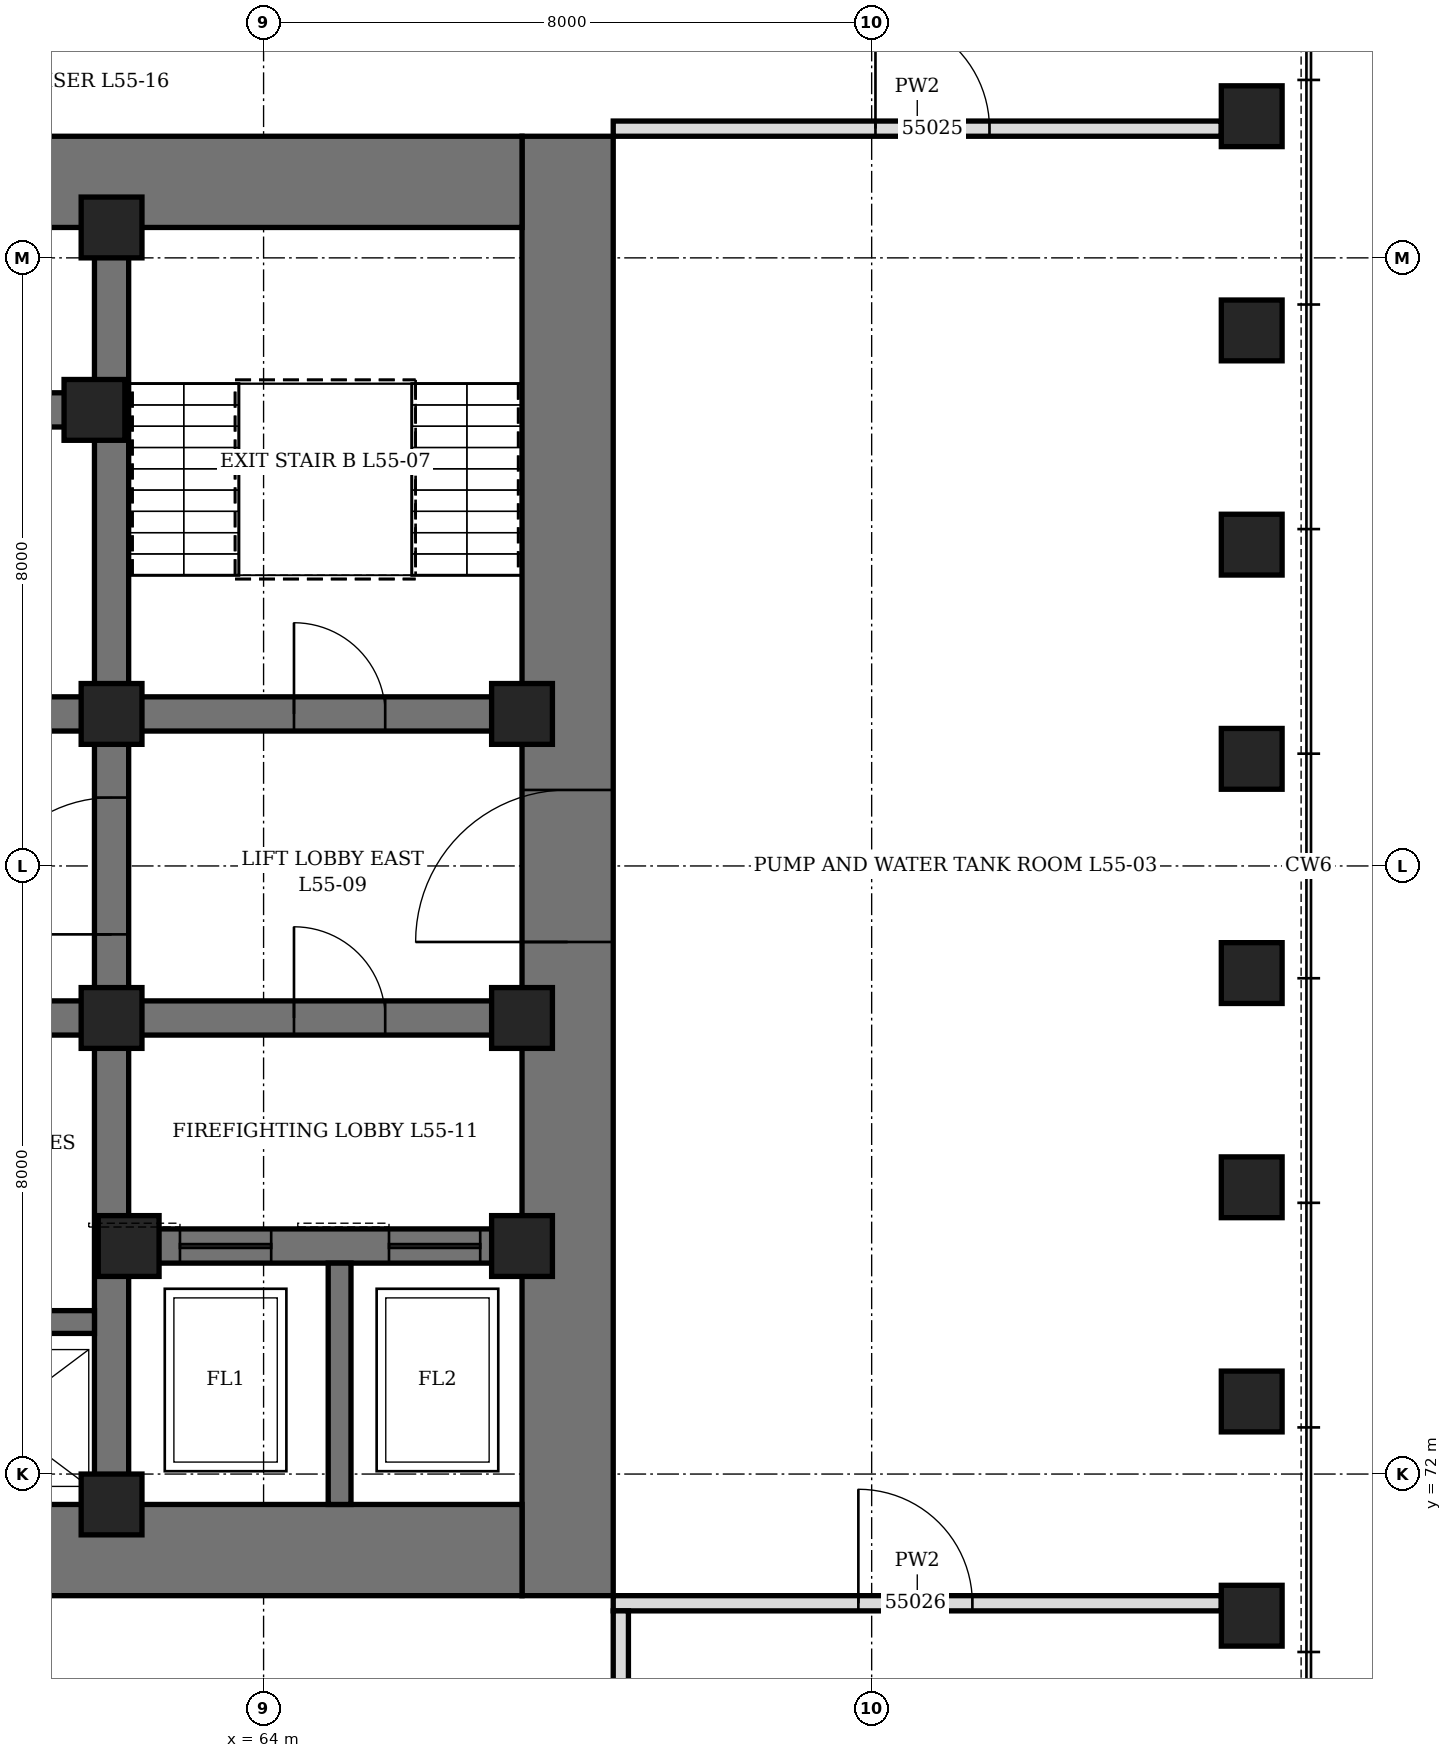
"""IFC4 building model, lengths in metres.
Left out: names, types, materials, properties, quantities, classifications, styles, units other than length and angle.
Written with IfcOpenShell. Run it as: python <this file> out.ifc"""

import sys

from ifc_helpers import new_model, si_unit, direction, frame, frame_2d, origin, origin_2d, place, context, subcontext, project, spatial, rectangle, hollow_rectangle, extrude, element, fill, save


model = new_model("IFC4")
c1 = context("Model", 3, precision=1e-05, world=origin(), true_north=direction((0.0, 1.0)))
c2 = subcontext(c1, "Body", "Model", "MODEL_VIEW")
j1 = project(units=[si_unit("LENGTHUNIT", "METRE"), si_unit("PLANEANGLEUNIT", "RADIAN")], contexts=[c1])
p1 = place(None, origin())
s1 = spatial("IfcSite", under=j1, at=p1, CompositionType="ELEMENT")
p2 = place(p1, origin())
s2 = spatial("IfcBuilding", under=s1, at=p2, CompositionType="ELEMENT")
p3 = place(p2, frame((0.0, 0.0, 244.3)))
s3 = spatial("IfcBuildingStorey", under=s2, at=p3, CompositionType="ELEMENT", Elevation=244.3)
for number, where, z_axis, x_axis in (
    (1, (77.0, 70.136, 0.0), (0.0, 0.0, 1.0), (0.0, 1.0, 0.0)),
    (2, (77.0, 72.955, 0.0), (0.0, 0.0, 1.0), (0.0, 1.0, 0.0)),
    (3, (77.0, 75.773, 0.0), (0.0, 0.0, 1.0), (0.0, 1.0, 0.0)),
    (4, (77.0, 78.591, 0.0), (0.0, 0.0, 1.0), (0.0, 1.0, 0.0)),
    (5, (77.0, 81.409, 0.0), (0.0, 0.0, 1.0), (0.0, 1.0, 0.0)),
    (6, (77.0, 84.227, 0.0), (0.0, 0.0, 1.0), (0.0, 1.0, 0.0)),
    (7, (77.0, 87.045, 0.0), (0.0, 0.0, 1.0), (0.0, 1.0, 0.0)),
    (8, (77.0, 89.864, 0.0), (0.0, 0.0, 1.0), (0.0, 1.0, 0.0)),
):
    element("IfcColumn", number, at=place(p3, frame(where, z_axis=z_axis, x_axis=x_axis)), inside=s3, PredefinedType="COLUMN", context=c2, shape_type="SweptSolid", body=[
        extrude(hollow_rectangle(XDim=0.8, YDim=0.8, WallThickness=0.15, at=origin_2d()), origin(), (0.0, 0.0, 1.0), 5.84),
    ])
p4 = place(p3, frame((68.0, 70.4, 0.0), z_axis=(0.0, 0.0, 1.0), x_axis=(0.0, 1.0, 0.0)))
e9 = element("IfcWall", 9, at=p4, inside=s3, PredefinedType="SHEAR", context=c2, shape_type="SweptSolid", body=[
    extrude(rectangle(XDim=19.2, YDim=1.2, at=frame_2d((9.6, 0.0))), origin(), (0.0, 0.0, 1.0), 6.0),
])
p5 = place(p4, frame((8.6, 0.0, 0.0)))
e10 = element("IfcOpeningElement", 10, at=p5, cuts=e9, PredefinedType="OPENING", context=c2, shape_type="SweptSolid", body=[
    extrude(rectangle(XDim=2.0, YDim=2.4, at=frame_2d((1.0, 1.2))), frame((0.0, 0.61, 0.0), z_axis=(0.0, -1.0, 0.0), x_axis=(1.0, 0.0, 0.0)), (0.0, 0.0, 1.0), 1.22),
])
p6 = place(p3, frame((44.6, 71.0, 0.0), z_axis=(0.0, 0.0, 1.0), x_axis=(1.0, 0.0, 0.0)))
e11 = element("IfcWall", 11, at=p6, inside=s3, PredefinedType="SHEAR", context=c2, shape_type="SweptSolid", body=[
    extrude(rectangle(XDim=22.8, YDim=1.2, at=frame_2d((11.4, 0.0))), origin(), (0.0, 0.0, 1.0), 6.0),
])
p7 = place(p3, frame((44.6, 89.0, 0.0), z_axis=(0.0, 0.0, 1.0), x_axis=(1.0, 0.0, 0.0)))
e12 = element("IfcWall", 12, at=p7, inside=s3, PredefinedType="SHEAR", context=c2, shape_type="SweptSolid", body=[
    extrude(rectangle(XDim=22.8, YDim=1.2, at=frame_2d((11.4, 0.0))), origin(), (0.0, 0.0, 1.0), 6.0),
])
p8 = place(p7, frame((7.9, 0.0, 0.0)))
e13 = element("IfcOpeningElement", 13, at=p8, cuts=e12, PredefinedType="OPENING", context=c2, shape_type="SweptSolid", body=[
    extrude(rectangle(XDim=1.0, YDim=2.1, at=frame_2d((0.5, 1.05))), frame((0.0, 0.61, 0.0), z_axis=(0.0, -1.0, 0.0), x_axis=(1.0, 0.0, 0.0)), (0.0, 0.0, 1.0), 1.22),
])
p9 = place(p7, frame((12.025, 0.0, 0.0)))
e14 = element("IfcOpeningElement", 14, at=p9, cuts=e12, PredefinedType="OPENING", context=c2, shape_type="SweptSolid", body=[
    extrude(rectangle(XDim=0.9, YDim=2.1, at=frame_2d((0.45, 1.05))), frame((0.0, 0.61, 0.0), z_axis=(0.0, -1.0, 0.0), x_axis=(1.0, 0.0, 0.0)), (0.0, 0.0, 1.0), 1.22),
])
p10 = place(p7, frame((13.962, 0.0, 0.0)))
e15 = element("IfcOpeningElement", 15, at=p10, cuts=e12, PredefinedType="OPENING", context=c2, shape_type="SweptSolid", body=[
    extrude(rectangle(XDim=0.9, YDim=2.1, at=frame_2d((0.45, 1.05))), frame((0.0, 0.61, 0.0), z_axis=(0.0, -1.0, 0.0), x_axis=(1.0, 0.0, 0.0)), (0.0, 0.0, 1.0), 1.22),
])
p11 = place(p3, frame((62.0, 71.6, 0.0), z_axis=(0.0, 0.0, 1.0), x_axis=(0.0, 1.0, 0.0)))
e16 = element("IfcWall", 16, at=p11, inside=s3, PredefinedType="SHEAR", context=c2, shape_type="SweptSolid", body=[
    extrude(rectangle(XDim=16.8, YDim=0.45, at=frame_2d((8.4, 0.0))), origin(), (0.0, 0.0, 1.0), 6.0),
])
p12 = place(p11, frame((7.5, 0.0, 0.0)))
e17 = element("IfcOpeningElement", 17, at=p12, cuts=e16, PredefinedType="OPENING", context=c2, shape_type="SweptSolid", body=[
    extrude(rectangle(XDim=1.8, YDim=2.4, at=frame_2d((0.9, 1.2))), frame((0.0, 0.235, 0.0), z_axis=(0.0, -1.0, 0.0), x_axis=(1.0, 0.0, 0.0)), (0.0, 0.0, 1.0), 0.47),
])
p13 = place(p3, frame((62.225, 75.0, 0.0), z_axis=(0.0, 0.0, 1.0), x_axis=(1.0, 0.0, 0.0)))
e18 = element("IfcWall", 18, at=p13, inside=s3, PredefinedType="SHEAR", context=c2, shape_type="SweptSolid", body=[
    extrude(rectangle(XDim=5.175, YDim=0.45, at=frame_2d((2.587, 0.0))), origin(), (0.0, 0.0, 1.0), 6.0),
])
p14 = place(p13, frame((0.675, 0.0, 0.0)))
e19 = element("IfcOpeningElement", 19, at=p14, cuts=e18, PredefinedType="OPENING", context=c2, shape_type="SweptSolid", body=[
    extrude(rectangle(XDim=1.2, YDim=2.2, at=frame_2d((0.6, 1.1))), frame((0.0, 0.235, 0.0), z_axis=(0.0, -1.0, 0.0), x_axis=(1.0, 0.0, 0.0)), (0.0, 0.0, 1.0), 0.47),
])
p15 = place(p13, frame((3.425, 0.0, 0.0)))
e20 = element("IfcOpeningElement", 20, at=p15, cuts=e18, PredefinedType="OPENING", context=c2, shape_type="SweptSolid", body=[
    extrude(rectangle(XDim=1.2, YDim=2.2, at=frame_2d((0.6, 1.1))), frame((0.0, 0.235, 0.0), z_axis=(0.0, -1.0, 0.0), x_axis=(1.0, 0.0, 0.0)), (0.0, 0.0, 1.0), 0.47),
])
p16 = place(p3, frame((62.225, 78.0, 0.0), z_axis=(0.0, 0.0, 1.0), x_axis=(1.0, 0.0, 0.0)))
e21 = element("IfcWall", 21, at=p16, inside=s3, PredefinedType="SHEAR", context=c2, shape_type="SweptSolid", body=[
    extrude(rectangle(XDim=5.175, YDim=0.45, at=frame_2d((2.587, 0.0))), origin(), (0.0, 0.0, 1.0), 6.0),
])
p17 = place(p16, frame((2.175, 0.0, 0.0)))
e22 = element("IfcOpeningElement", 22, at=p17, cuts=e21, PredefinedType="OPENING", context=c2, shape_type="SweptSolid", body=[
    extrude(rectangle(XDim=1.2, YDim=2.1, at=frame_2d((0.6, 1.05))), frame((0.0, 0.235, 0.0), z_axis=(0.0, -1.0, 0.0), x_axis=(1.0, 0.0, 0.0)), (0.0, 0.0, 1.0), 0.47),
])
p18 = place(p3, frame((62.225, 82.0, 0.0), z_axis=(0.0, 0.0, 1.0), x_axis=(1.0, 0.0, 0.0)))
e23 = element("IfcWall", 23, at=p18, inside=s3, PredefinedType="SHEAR", context=c2, shape_type="SweptSolid", body=[
    extrude(rectangle(XDim=5.175, YDim=0.45, at=frame_2d((2.587, 0.0))), origin(), (0.0, 0.0, 1.0), 6.0),
])
p19 = place(p18, frame((2.175, 0.0, 0.0)))
e24 = element("IfcOpeningElement", 24, at=p19, cuts=e23, PredefinedType="OPENING", context=c2, shape_type="SweptSolid", body=[
    extrude(rectangle(XDim=1.2, YDim=2.1, at=frame_2d((0.6, 1.05))), frame((0.0, 0.235, 0.0), z_axis=(0.0, -1.0, 0.0), x_axis=(1.0, 0.0, 0.0)), (0.0, 0.0, 1.0), 0.47),
])
p20 = place(p3, frame((50.225, 78.0, 0.0), z_axis=(0.0, 0.0, 1.0), x_axis=(1.0, 0.0, 0.0)))
e25 = element("IfcWall", 25, at=p20, inside=s3, PredefinedType="SHEAR", context=c2, shape_type="SweptSolid", body=[
    extrude(rectangle(XDim=11.55, YDim=0.45, at=frame_2d((5.775, 0.0))), origin(), (0.0, 0.0, 1.0), 6.0),
])
p21 = place(p20, frame((0.825, 0.0, 0.0)))
e26 = element("IfcOpeningElement", 26, at=p21, cuts=e25, PredefinedType="OPENING", context=c2, shape_type="SweptSolid", body=[
    extrude(rectangle(XDim=0.9, YDim=2.1, at=frame_2d((0.45, 1.05))), frame((0.0, 0.235, 0.0), z_axis=(0.0, -1.0, 0.0), x_axis=(1.0, 0.0, 0.0)), (0.0, 0.0, 1.0), 0.47),
])
p22 = place(p20, frame((3.825, 0.0, 0.0)))
e27 = element("IfcOpeningElement", 27, at=p22, cuts=e25, PredefinedType="OPENING", context=c2, shape_type="SweptSolid", body=[
    extrude(rectangle(XDim=0.9, YDim=2.1, at=frame_2d((0.45, 1.05))), frame((0.0, 0.235, 0.0), z_axis=(0.0, -1.0, 0.0), x_axis=(1.0, 0.0, 0.0)), (0.0, 0.0, 1.0), 0.47),
])
p23 = place(p20, frame((6.825, 0.0, 0.0)))
e28 = element("IfcOpeningElement", 28, at=p23, cuts=e25, PredefinedType="OPENING", context=c2, shape_type="SweptSolid", body=[
    extrude(rectangle(XDim=0.9, YDim=2.1, at=frame_2d((0.45, 1.05))), frame((0.0, 0.235, 0.0), z_axis=(0.0, -1.0, 0.0), x_axis=(1.0, 0.0, 0.0)), (0.0, 0.0, 1.0), 0.47),
])
p24 = place(p20, frame((9.825, 0.0, 0.0)))
e29 = element("IfcOpeningElement", 29, at=p24, cuts=e25, PredefinedType="OPENING", context=c2, shape_type="SweptSolid", body=[
    extrude(rectangle(XDim=0.9, YDim=2.1, at=frame_2d((0.45, 1.05))), frame((0.0, 0.235, 0.0), z_axis=(0.0, -1.0, 0.0), x_axis=(1.0, 0.0, 0.0)), (0.0, 0.0, 1.0), 0.47),
])
p25 = place(p3, frame((50.225, 82.0, 0.0), z_axis=(0.0, 0.0, 1.0), x_axis=(1.0, 0.0, 0.0)))
e30 = element("IfcWall", 30, at=p25, inside=s3, PredefinedType="SHEAR", context=c2, shape_type="SweptSolid", body=[
    extrude(rectangle(XDim=11.55, YDim=0.45, at=frame_2d((5.775, 0.0))), origin(), (0.0, 0.0, 1.0), 6.0),
])
p26 = place(p25, frame((0.825, 0.0, 0.0)))
e31 = element("IfcOpeningElement", 31, at=p26, cuts=e30, PredefinedType="OPENING", context=c2, shape_type="SweptSolid", body=[
    extrude(rectangle(XDim=0.9, YDim=2.1, at=frame_2d((0.45, 1.05))), frame((0.0, 0.235, 0.0), z_axis=(0.0, -1.0, 0.0), x_axis=(1.0, 0.0, 0.0)), (0.0, 0.0, 1.0), 0.47),
])
p27 = place(p25, frame((3.825, 0.0, 0.0)))
e32 = element("IfcOpeningElement", 32, at=p27, cuts=e30, PredefinedType="OPENING", context=c2, shape_type="SweptSolid", body=[
    extrude(rectangle(XDim=0.9, YDim=2.1, at=frame_2d((0.45, 1.05))), frame((0.0, 0.235, 0.0), z_axis=(0.0, -1.0, 0.0), x_axis=(1.0, 0.0, 0.0)), (0.0, 0.0, 1.0), 0.47),
])
p28 = place(p25, frame((6.825, 0.0, 0.0)))
e33 = element("IfcOpeningElement", 33, at=p28, cuts=e30, PredefinedType="OPENING", context=c2, shape_type="SweptSolid", body=[
    extrude(rectangle(XDim=0.9, YDim=2.1, at=frame_2d((0.45, 1.05))), frame((0.0, 0.235, 0.0), z_axis=(0.0, -1.0, 0.0), x_axis=(1.0, 0.0, 0.0)), (0.0, 0.0, 1.0), 0.47),
])
p29 = place(p25, frame((9.825, 0.0, 0.0)))
e34 = element("IfcOpeningElement", 34, at=p29, cuts=e30, PredefinedType="OPENING", context=c2, shape_type="SweptSolid", body=[
    extrude(rectangle(XDim=0.9, YDim=2.1, at=frame_2d((0.45, 1.05))), frame((0.0, 0.235, 0.0), z_axis=(0.0, -1.0, 0.0), x_axis=(1.0, 0.0, 0.0)), (0.0, 0.0, 1.0), 0.47),
])
p30 = place(p3, frame((50.225, 86.0, 0.0), z_axis=(0.0, 0.0, 1.0), x_axis=(1.0, 0.0, 0.0)))
e35 = element("IfcWall", 35, at=p30, inside=s3, PredefinedType="SHEAR", context=c2, shape_type="SweptSolid", body=[
    extrude(rectangle(XDim=11.55, YDim=0.45, at=frame_2d((5.775, 0.0))), origin(), (0.0, 0.0, 1.0), 6.0),
])
p31 = place(p3, frame((50.225, 74.0, 0.0), z_axis=(0.0, 0.0, 1.0), x_axis=(1.0, 0.0, 0.0)))
e36 = element("IfcWall", 36, at=p31, inside=s3, PredefinedType="SHEAR", context=c2, shape_type="SweptSolid", body=[
    extrude(rectangle(XDim=11.55, YDim=0.3, at=frame_2d((5.775, 0.0))), origin(), (0.0, 0.0, 1.0), 6.0),
])
p32 = place(p3, frame((65.0, 71.6, 0.0), z_axis=(0.0, 0.0, 1.0), x_axis=(0.0, 1.0, 0.0)))
e37 = element("IfcWall", 37, at=p32, inside=s3, PredefinedType="SHEAR", context=c2, shape_type="SweptSolid", body=[
    extrude(rectangle(XDim=3.175, YDim=0.3, at=frame_2d((1.587, 0.0))), origin(), (0.0, 0.0, 1.0), 6.0),
])
for number, where, z_axis, x_axis in (
    (38, (61.775, 86.0, 0.0), (0.0, 0.0, 1.0), (1.0, 0.0, 0.0)),
    (39, (62.0, 71.6, 0.0), (0.0, 0.0, 1.0), (1.0, 0.0, 0.0)),
    (40, (62.0, 78.0, 0.0), (0.0, 0.0, 1.0), (1.0, 0.0, 0.0)),
    (41, (62.0, 82.0, 0.0), (0.0, 0.0, 1.0), (1.0, 0.0, 0.0)),
    (42, (62.0, 88.4, 0.0), (0.0, 0.0, 1.0), (1.0, 0.0, 0.0)),
    (43, (62.225, 75.0, 0.0), (0.0, 0.0, 1.0), (1.0, 0.0, 0.0)),
    (44, (67.4, 75.0, 0.0), (0.0, 0.0, 1.0), (1.0, 0.0, 0.0)),
    (45, (67.4, 78.0, 0.0), (0.0, 0.0, 1.0), (1.0, 0.0, 0.0)),
    (46, (67.4, 82.0, 0.0), (0.0, 0.0, 1.0), (1.0, 0.0, 0.0)),
):
    element("IfcColumn", number, at=place(p3, frame(where, z_axis=z_axis, x_axis=x_axis)), inside=s3, PredefinedType="COLUMN", context=c2, shape_type="SweptSolid", body=[
        extrude(hollow_rectangle(XDim=0.8, YDim=0.8, WallThickness=0.1, at=origin_2d()), origin(), (0.0, 0.0, 1.0), 6.0),
    ])
p33 = place(p3, frame((68.6, 89.7, 0.0), z_axis=(0.0, 0.0, 1.0), x_axis=(1.0, 0.0, 0.0)))
e47 = element("IfcWall", 47, at=p33, inside=s3, PredefinedType="PARTITIONING", context=c2, shape_type="SweptSolid", body=[
    extrude(rectangle(XDim=8.0, YDim=0.2, at=frame_2d((4.0, 0.0))), origin(), (0.0, 0.0, 1.0), 5.84),
])
p34 = place(p33, frame((3.45, 0.0, 0.0)))
e48 = element("IfcOpeningElement", 48, at=p34, cuts=e47, PredefinedType="OPENING", context=c2, shape_type="SweptSolid", body=[
    extrude(rectangle(XDim=1.5, YDim=2.4, at=frame_2d((0.75, 1.2))), frame((0.0, 0.11, 0.0), z_axis=(0.0, -1.0, 0.0), x_axis=(1.0, 0.0, 0.0)), (0.0, 0.0, 1.0), 0.22),
])
p35 = place(p3, frame((68.6, 70.3, 0.0), z_axis=(0.0, 0.0, 1.0), x_axis=(1.0, 0.0, 0.0)))
e49 = element("IfcWall", 49, at=p35, inside=s3, PredefinedType="PARTITIONING", context=c2, shape_type="SweptSolid", body=[
    extrude(rectangle(XDim=8.0, YDim=0.2, at=frame_2d((4.0, 0.0))), origin(), (0.0, 0.0, 1.0), 5.84),
])
p36 = place(p35, frame((3.225, 0.0, 0.0)))
e50 = element("IfcOpeningElement", 50, at=p36, cuts=e49, PredefinedType="OPENING", context=c2, shape_type="SweptSolid", body=[
    extrude(rectangle(XDim=1.5, YDim=2.4, at=frame_2d((0.75, 1.2))), frame((0.0, 0.11, 0.0), z_axis=(0.0, -1.0, 0.0), x_axis=(1.0, 0.0, 0.0)), (0.0, 0.0, 1.0), 0.22),
])
p37 = place(p3, frame((68.7, 70.2, 0.0), z_axis=(0.0, 0.0, 1.0), x_axis=(0.0, -1.0, 0.0)))
e51 = element("IfcWall", 51, at=p37, inside=s3, PredefinedType="PARTITIONING", context=c2, shape_type="SweptSolid", body=[
    extrude(rectangle(XDim=10.8, YDim=0.2, at=frame_2d((5.4, 0.0))), origin(), (0.0, 0.0, 1.0), 5.078),
])
p38 = place(p37, frame((4.525, 0.0, 0.0)))
e52 = element("IfcOpeningElement", 52, at=p38, cuts=e51, PredefinedType="OPENING", context=c2, shape_type="SweptSolid", body=[
    extrude(rectangle(XDim=1.5, YDim=2.4, at=frame_2d((0.75, 1.2))), frame((0.0, 0.11, 0.0), z_axis=(0.0, -1.0, 0.0), x_axis=(1.0, 0.0, 0.0)), (0.0, 0.0, 1.0), 0.22),
])
p39 = place(p19, origin())
e53 = element("IfcDoor", 53, at=p39, inside=s3, OperationType="SINGLE_SWING_LEFT", PredefinedType="DOOR", context=c2, shape_type="SweptSolid", body=[
    extrude(rectangle(XDim=1.2, YDim=2.1, at=frame_2d((0.6, 1.05))), frame((0.0, 0.225, 0.0), z_axis=(0.0, -1.0, 0.0), x_axis=(1.0, 0.0, 0.0)), (0.0, 0.0, 1.0), 0.449),
])
fill(e24, e53)
p40 = place(p5, origin())
e54 = element("IfcDoor", 54, at=p40, inside=s3, OperationType="DOUBLE_DOOR_SINGLE_SWING", PredefinedType="DOOR", context=c2, shape_type="SweptSolid", body=[
    extrude(rectangle(XDim=2.0, YDim=2.4, at=frame_2d((1.0, 1.2))), frame((0.0, 0.35, 0.0), z_axis=(0.0, -1.0, 0.0), x_axis=(1.0, 0.0, 0.0)), (0.0, 0.0, 1.0), 0.7),
])
fill(e10, e54)
p41 = place(p12, origin())
e55 = element("IfcDoor", 55, at=p41, inside=s3, OperationType="DOUBLE_DOOR_SINGLE_SWING", PredefinedType="DOOR", context=c2, shape_type="SweptSolid", body=[
    extrude(rectangle(XDim=1.8, YDim=2.4, at=frame_2d((0.9, 1.2))), frame((0.0, 0.225, 0.0), z_axis=(0.0, -1.0, 0.0), x_axis=(1.0, 0.0, 0.0)), (0.0, 0.0, 1.0), 0.449),
])
fill(e17, e55)
p42 = place(p17, origin())
e56 = element("IfcDoor", 56, at=p42, inside=s3, OperationType="SINGLE_SWING_RIGHT", PredefinedType="DOOR", context=c2, shape_type="SweptSolid", body=[
    extrude(rectangle(XDim=1.2, YDim=2.1, at=frame_2d((0.6, 1.05))), frame((0.0, 0.225, 0.0), z_axis=(0.0, -1.0, 0.0), x_axis=(1.0, 0.0, 0.0)), (0.0, 0.0, 1.0), 0.449),
])
fill(e22, e56)
p43 = place(p14, origin())
e57 = element("IfcDoor", 57, at=p43, inside=s3, OperationType="SLIDING_TO_LEFT", PredefinedType="DOOR", context=c2, shape_type="SweptSolid", body=[
    extrude(rectangle(XDim=1.2, YDim=2.2, at=frame_2d((0.6, 1.1))), frame((0.0, 0.225, 0.0), z_axis=(0.0, -1.0, 0.0), x_axis=(1.0, 0.0, 0.0)), (0.0, 0.0, 1.0), 0.449),
])
fill(e19, e57)
p44 = place(p15, origin())
e58 = element("IfcDoor", 58, at=p44, inside=s3, OperationType="SLIDING_TO_LEFT", PredefinedType="DOOR", context=c2, shape_type="SweptSolid", body=[
    extrude(rectangle(XDim=1.2, YDim=2.2, at=frame_2d((0.6, 1.1))), frame((0.0, 0.225, 0.0), z_axis=(0.0, -1.0, 0.0), x_axis=(1.0, 0.0, 0.0)), (0.0, 0.0, 1.0), 0.449),
])
fill(e20, e58)
p45 = place(p34, origin())
e59 = element("IfcDoor", 59, at=p45, inside=s3, OperationType="DOUBLE_DOOR_SINGLE_SWING", PredefinedType="DOOR", context=c2, shape_type="SweptSolid", body=[
    extrude(rectangle(XDim=1.5, YDim=2.4, at=frame_2d((0.75, 1.2))), frame((0.0, 0.1, 0.0), z_axis=(0.0, -1.0, 0.0), x_axis=(1.0, 0.0, 0.0)), (0.0, 0.0, 1.0), 0.199),
])
fill(e48, e59)
p46 = place(p36, origin())
e60 = element("IfcDoor", 60, at=p46, inside=s3, OperationType="DOUBLE_DOOR_SINGLE_SWING", PredefinedType="DOOR", context=c2, shape_type="SweptSolid", body=[
    extrude(rectangle(XDim=1.5, YDim=2.4, at=frame_2d((0.75, 1.2))), frame((0.0, 0.1, 0.0), z_axis=(0.0, -1.0, 0.0), x_axis=(1.0, 0.0, 0.0)), (0.0, 0.0, 1.0), 0.199),
])
fill(e50, e60)
save(model, sys.argv[1])
